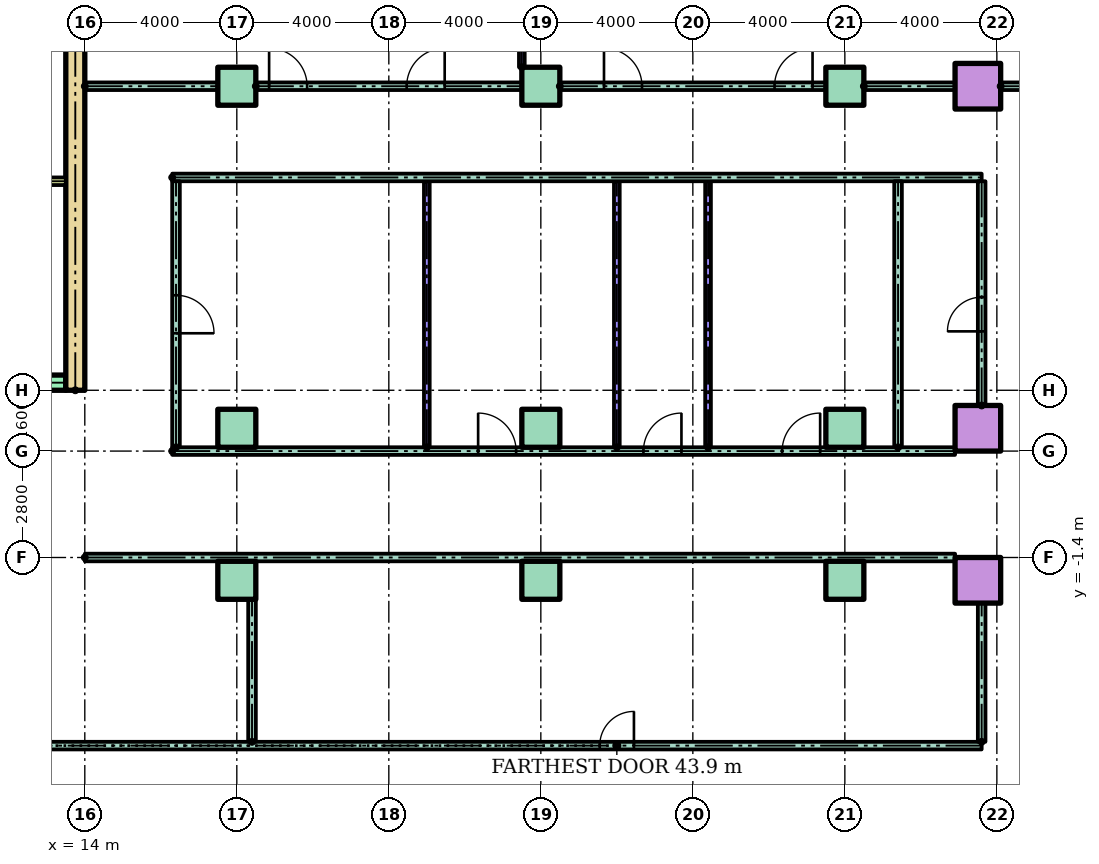
"""IFC4 building model, lengths in metres.
Left out: names, types, materials, properties, quantities, classifications, styles, units other than length and angle.
Written with IfcOpenShell. Run it as: python <this file> out.ifc"""

import sys

from ifc_helpers import new_model, si_unit, direction, frame, frame_2d, origin, origin_2d, place, context, subcontext, project, spatial, rectangle, hollow_rectangle, extrude, element, fill, save


model = new_model("IFC4")
c1 = context("Model", 3, precision=1e-05, world=origin(), true_north=direction((0.0, 1.0)))
c2 = subcontext(c1, "Body", "Model", "MODEL_VIEW")
j1 = project(units=[si_unit("LENGTHUNIT", "METRE"), si_unit("PLANEANGLEUNIT", "RADIAN")], contexts=[c1])
p1 = place(None, origin())
s1 = spatial("IfcSite", under=j1, at=p1, CompositionType="ELEMENT")
p2 = place(p1, origin())
s2 = spatial("IfcBuilding", under=s1, at=p2, CompositionType="ELEMENT")
p3 = place(p2, frame((0.0, 0.0, 10.0)))
s3 = spatial("IfcBuildingStorey", under=s2, at=p3, CompositionType="ELEMENT", Elevation=10.0)
for number, where in (
    (1, (18.0, -2.0, 0.0)),
    (2, (26.0, -2.0, 0.0)),
    (3, (34.0, -2.0, 0.0)),
):
    element("IfcColumn", number, at=place(p3, frame(where)), inside=s3, PredefinedType="COLUMN", context=c2, shape_type="SweptSolid", body=[
        extrude(rectangle(XDim=1.0, YDim=1.0, at=origin_2d()), origin(), (0.0, 0.0, 1.0), 4.0),
    ])
p4 = place(p3, frame((37.5, -2.0, 0.0)))
e4 = element("IfcColumn", 4, at=p4, inside=s3, PredefinedType="COLUMN", context=c2, shape_type="SweptSolid", body=[
    extrude(hollow_rectangle(XDim=1.2, YDim=1.2, WallThickness=0.06, at=origin_2d()), origin(), (0.0, 0.0, 1.0), 4.0),
])
for number, where in (
    (5, (18.0, 2.0, 0.0)),
    (6, (26.0, 2.0, 0.0)),
    (7, (34.0, 2.0, 0.0)),
):
    element("IfcColumn", number, at=place(p3, frame(where)), inside=s3, PredefinedType="COLUMN", context=c2, shape_type="SweptSolid", body=[
        extrude(rectangle(XDim=1.0, YDim=1.0, at=origin_2d()), origin(), (0.0, 0.0, 1.0), 4.0),
    ])
p5 = place(p3, frame((37.5, 2.0, 0.0)))
e8 = element("IfcColumn", 8, at=p5, inside=s3, PredefinedType="COLUMN", context=c2, shape_type="SweptSolid", body=[
    extrude(hollow_rectangle(XDim=1.2, YDim=1.2, WallThickness=0.06, at=origin_2d()), origin(), (0.0, 0.0, 1.0), 4.0),
])
for number, where in (
    (9, (18.0, 11.0, 0.0)),
    (10, (26.0, 11.0, 0.0)),
    (11, (34.0, 11.0, 0.0)),
):
    element("IfcColumn", number, at=place(p3, frame(where)), inside=s3, PredefinedType="COLUMN", context=c2, shape_type="SweptSolid", body=[
        extrude(rectangle(XDim=1.0, YDim=1.0, at=origin_2d()), origin(), (0.0, 0.0, 1.0), 4.0),
    ])
p6 = place(p3, frame((37.5, 11.0, 0.0)))
e12 = element("IfcColumn", 12, at=p6, inside=s3, PredefinedType="COLUMN", context=c2, shape_type="SweptSolid", body=[
    extrude(hollow_rectangle(XDim=1.2, YDim=1.2, WallThickness=0.06, at=origin_2d()), origin(), (0.0, 0.0, 1.0), 4.0),
])
p7 = place(p3, frame((13.75, 3.0, 0.0), z_axis=(0.0, 0.0, 1.0), x_axis=(0.0, 1.0, 0.0)))
e13 = element("IfcWall", 13, at=p7, inside=s3, PredefinedType="SHEAR", context=c2, shape_type="SweptSolid", body=[
    extrude(rectangle(XDim=17.0, YDim=0.5, at=frame_2d((8.5, 0.0))), origin(), (0.0, 0.0, 1.0), 3.7),
])
p8 = place(p3, frame((-13.5, 3.2, 0.0)))
e14 = element("IfcWall", 14, at=p8, inside=s3, PredefinedType="SHEAR", context=c2, shape_type="SweptSolid", body=[
    extrude(rectangle(XDim=27.0, YDim=0.4, at=frame_2d((13.5, 0.0))), origin(), (0.0, 0.0, 1.0), 3.7),
])
p9 = place(p8, frame((6.861, 0.0, 0.0)))
e15 = element("IfcOpeningElement", 15, at=p9, cuts=e14, PredefinedType="OPENING", context=c2, shape_type="SweptSolid", body=[
    extrude(rectangle(XDim=1.1, YDim=2.1, at=frame_2d((0.55, 1.05))), frame((0.0, 0.21, 0.0), z_axis=(0.0, -1.0, 0.0), x_axis=(1.0, 0.0, 0.0)), (0.0, 0.0, 1.0), 0.42),
])
p10 = place(p8, frame((9.906, 0.0, 0.0)))
e16 = element("IfcOpeningElement", 16, at=p10, cuts=e14, PredefinedType="OPENING", context=c2, shape_type="SweptSolid", body=[
    extrude(rectangle(XDim=1.1, YDim=2.1, at=frame_2d((0.55, 1.05))), frame((0.0, 0.21, 0.0), z_axis=(0.0, -1.0, 0.0), x_axis=(1.0, 0.0, 0.0)), (0.0, 0.0, 1.0), 0.42),
])
p11 = place(p8, frame((15.994, 0.0, 0.0)))
e17 = element("IfcOpeningElement", 17, at=p11, cuts=e14, PredefinedType="OPENING", context=c2, shape_type="SweptSolid", body=[
    extrude(rectangle(XDim=1.1, YDim=2.1, at=frame_2d((0.55, 1.05))), frame((0.0, 0.21, 0.0), z_axis=(0.0, -1.0, 0.0), x_axis=(1.0, 0.0, 0.0)), (0.0, 0.0, 1.0), 0.42),
])
p12 = place(p8, frame((19.039, 0.0, 0.0)))
e18 = element("IfcOpeningElement", 18, at=p12, cuts=e14, PredefinedType="OPENING", context=c2, shape_type="SweptSolid", body=[
    extrude(rectangle(XDim=1.1, YDim=2.1, at=frame_2d((0.55, 1.05))), frame((0.0, 0.21, 0.0), z_axis=(0.0, -1.0, 0.0), x_axis=(1.0, 0.0, 0.0)), (0.0, 0.0, 1.0), 0.42),
])
p13 = place(p8, frame((12.6, 0.0, 0.0)))
e19 = element("IfcOpeningElement", 19, at=p13, cuts=e14, PredefinedType="OPENING", context=c2, shape_type="SweptSolid", body=[
    extrude(rectangle(XDim=1.8, YDim=2.1, at=frame_2d((0.9, 1.05))), frame((0.0, 0.21, 0.0), z_axis=(0.0, -1.0, 0.0), x_axis=(1.0, 0.0, 0.0)), (0.0, 0.0, 1.0), 0.42),
])
p14 = place(p3, frame((9.6, 8.5, 0.0)))
e20 = element("IfcWall", 20, at=p14, inside=s3, PredefinedType="PARTITIONING", context=c2, shape_type="SweptSolid", body=[
    extrude(rectangle(XDim=3.9, YDim=0.2, at=frame_2d((1.95, 0.0))), origin(), (0.0, 0.0, 1.0), 3.7),
])
p15 = place(p3, frame((-37.6, -6.35, 0.0)))
e21 = element("IfcWall", 21, at=p15, inside=s3, PredefinedType="PARTITIONING", context=c2, shape_type="SweptSolid", body=[
    extrude(rectangle(XDim=75.2, YDim=0.2, at=frame_2d((37.6, 0.0))), origin(), (0.0, 0.0, 1.0), 3.7),
])
p16 = place(p15, frame((6.5, 0.0, 0.0)))
e22 = element("IfcOpeningElement", 22, at=p16, cuts=e21, PredefinedType="OPENING", context=c2, shape_type="SweptSolid", body=[
    extrude(rectangle(XDim=1.0, YDim=2.1, at=frame_2d((0.5, 1.05))), frame((0.0, 0.11, 0.0), z_axis=(0.0, -1.0, 0.0), x_axis=(1.0, 0.0, 0.0)), (0.0, 0.0, 1.0), 0.22),
])
p17 = place(p15, frame((18.55, 0.0, 0.0)))
e23 = element("IfcOpeningElement", 23, at=p17, cuts=e21, PredefinedType="OPENING", context=c2, shape_type="SweptSolid", body=[
    extrude(rectangle(XDim=0.9, YDim=2.1, at=frame_2d((0.45, 1.05))), frame((0.0, 0.11, 0.0), z_axis=(0.0, -1.0, 0.0), x_axis=(1.0, 0.0, 0.0)), (0.0, 0.0, 1.0), 0.22),
])
p18 = place(p15, frame((27.55, 0.0, 0.0)))
e24 = element("IfcOpeningElement", 24, at=p18, cuts=e21, PredefinedType="OPENING", context=c2, shape_type="SweptSolid", body=[
    extrude(rectangle(XDim=0.9, YDim=2.1, at=frame_2d((0.45, 1.05))), frame((0.0, 0.11, 0.0), z_axis=(0.0, -1.0, 0.0), x_axis=(1.0, 0.0, 0.0)), (0.0, 0.0, 1.0), 0.22),
])
p19 = place(p15, frame((36.55, 0.0, 0.0)))
e25 = element("IfcOpeningElement", 25, at=p19, cuts=e21, PredefinedType="OPENING", context=c2, shape_type="SweptSolid", body=[
    extrude(rectangle(XDim=0.9, YDim=2.1, at=frame_2d((0.45, 1.05))), frame((0.0, 0.11, 0.0), z_axis=(0.0, -1.0, 0.0), x_axis=(1.0, 0.0, 0.0)), (0.0, 0.0, 1.0), 0.22),
])
p20 = place(p15, frame((48.5, 0.0, 0.0)))
e26 = element("IfcOpeningElement", 26, at=p20, cuts=e21, PredefinedType="OPENING", context=c2, shape_type="SweptSolid", body=[
    extrude(rectangle(XDim=1.0, YDim=2.1, at=frame_2d((0.5, 1.05))), frame((0.0, 0.11, 0.0), z_axis=(0.0, -1.0, 0.0), x_axis=(1.0, 0.0, 0.0)), (0.0, 0.0, 1.0), 0.22),
])
p21 = place(p15, frame((65.15, 0.0, 0.0)))
e27 = element("IfcOpeningElement", 27, at=p21, cuts=e21, PredefinedType="OPENING", context=c2, shape_type="SweptSolid", body=[
    extrude(rectangle(XDim=0.9, YDim=2.1, at=frame_2d((0.45, 1.05))), frame((0.0, 0.11, 0.0), z_axis=(0.0, -1.0, 0.0), x_axis=(1.0, 0.0, 0.0)), (0.0, 0.0, 1.0), 0.22),
])
p22 = place(p3, frame((14.0, -1.4, 0.0)))
e28 = element("IfcWall", 28, at=p22, inside=s3, PredefinedType="PARTITIONING", context=c2, shape_type="SweptSolid", body=[
    extrude(rectangle(XDim=22.9, YDim=0.2, at=frame_2d((11.45, 0.0))), origin(), (0.0, 0.0, 1.0), 3.7),
])
p23 = place(p3, frame((16.3, 1.4, 0.0)))
e29 = element("IfcWall", 29, at=p23, inside=s3, PredefinedType="PARTITIONING", context=c2, shape_type="SweptSolid", body=[
    extrude(rectangle(XDim=20.6, YDim=0.2, at=frame_2d((10.3, 0.0))), origin(), (0.0, 0.0, 1.0), 3.7),
])
p24 = place(p23, frame((8.05, 0.0, 0.0)))
e30 = element("IfcOpeningElement", 30, at=p24, cuts=e29, PredefinedType="OPENING", context=c2, shape_type="SweptSolid", body=[
    extrude(rectangle(XDim=1.0, YDim=2.1, at=frame_2d((0.5, 1.05))), frame((0.0, 0.11, 0.0), z_axis=(0.0, -1.0, 0.0), x_axis=(1.0, 0.0, 0.0)), (0.0, 0.0, 1.0), 0.22),
])
p25 = place(p23, frame((12.4, 0.0, 0.0)))
e31 = element("IfcOpeningElement", 31, at=p25, cuts=e29, PredefinedType="OPENING", context=c2, shape_type="SweptSolid", body=[
    extrude(rectangle(XDim=1.0, YDim=2.1, at=frame_2d((0.5, 1.05))), frame((0.0, 0.11, 0.0), z_axis=(0.0, -1.0, 0.0), x_axis=(1.0, 0.0, 0.0)), (0.0, 0.0, 1.0), 0.22),
])
p26 = place(p23, frame((16.05, 0.0, 0.0)))
e32 = element("IfcOpeningElement", 32, at=p26, cuts=e29, PredefinedType="OPENING", context=c2, shape_type="SweptSolid", body=[
    extrude(rectangle(XDim=1.0, YDim=2.1, at=frame_2d((0.5, 1.05))), frame((0.0, 0.11, 0.0), z_axis=(0.0, -1.0, 0.0), x_axis=(1.0, 0.0, 0.0)), (0.0, 0.0, 1.0), 0.22),
])
p27 = place(p3, frame((16.3, 8.6, 0.0)))
e33 = element("IfcWall", 33, at=p27, inside=s3, PredefinedType="PARTITIONING", context=c2, shape_type="SweptSolid", body=[
    extrude(rectangle(XDim=21.3, YDim=0.2, at=frame_2d((10.65, 0.0))), origin(), (0.0, 0.0, 1.0), 3.7),
])
p28 = place(p3, frame((14.0, 11.0, 0.0)))
e34 = element("IfcWall", 34, at=p28, inside=s3, PredefinedType="PARTITIONING", context=c2, shape_type="SweptSolid", body=[
    extrude(rectangle(XDim=3.5, YDim=0.2, at=frame_2d((1.75, 0.0))), origin(), (0.0, 0.0, 1.0), 3.7),
])
p29 = place(p3, frame((18.5, 11.0, 0.0)))
e35 = element("IfcWall", 35, at=p29, inside=s3, PredefinedType="PARTITIONING", context=c2, shape_type="SweptSolid", body=[
    extrude(rectangle(XDim=7.0, YDim=0.2, at=frame_2d((3.5, 0.0))), origin(), (0.0, 0.0, 1.0), 3.7),
])
p30 = place(p29, frame((0.35, 0.0, 0.0)))
e36 = element("IfcOpeningElement", 36, at=p30, cuts=e35, PredefinedType="OPENING", context=c2, shape_type="SweptSolid", body=[
    extrude(rectangle(XDim=1.0, YDim=2.1, at=frame_2d((0.5, 1.05))), frame((0.0, 0.11, 0.0), z_axis=(0.0, -1.0, 0.0), x_axis=(1.0, 0.0, 0.0)), (0.0, 0.0, 1.0), 0.22),
])
p31 = place(p29, frame((3.97, 0.0, 0.0)))
e37 = element("IfcOpeningElement", 37, at=p31, cuts=e35, PredefinedType="OPENING", context=c2, shape_type="SweptSolid", body=[
    extrude(rectangle(XDim=1.0, YDim=2.1, at=frame_2d((0.5, 1.05))), frame((0.0, 0.11, 0.0), z_axis=(0.0, -1.0, 0.0), x_axis=(1.0, 0.0, 0.0)), (0.0, 0.0, 1.0), 0.22),
])
p32 = place(p3, frame((26.5, 11.0, 0.0)))
e38 = element("IfcWall", 38, at=p32, inside=s3, PredefinedType="PARTITIONING", context=c2, shape_type="SweptSolid", body=[
    extrude(rectangle(XDim=7.0, YDim=0.2, at=frame_2d((3.5, 0.0))), origin(), (0.0, 0.0, 1.0), 3.7),
])
p33 = place(p32, frame((1.162, 0.0, 0.0)))
e39 = element("IfcOpeningElement", 39, at=p33, cuts=e38, PredefinedType="OPENING", context=c2, shape_type="SweptSolid", body=[
    extrude(rectangle(XDim=1.0, YDim=2.1, at=frame_2d((0.5, 1.05))), frame((0.0, 0.11, 0.0), z_axis=(0.0, -1.0, 0.0), x_axis=(1.0, 0.0, 0.0)), (0.0, 0.0, 1.0), 0.22),
])
p34 = place(p32, frame((5.65, 0.0, 0.0)))
e40 = element("IfcOpeningElement", 40, at=p34, cuts=e38, PredefinedType="OPENING", context=c2, shape_type="SweptSolid", body=[
    extrude(rectangle(XDim=1.0, YDim=2.1, at=frame_2d((0.5, 1.05))), frame((0.0, 0.11, 0.0), z_axis=(0.0, -1.0, 0.0), x_axis=(1.0, 0.0, 0.0)), (0.0, 0.0, 1.0), 0.22),
])
p35 = place(p3, frame((34.5, 11.0, 0.0)))
e41 = element("IfcWall", 41, at=p35, inside=s3, PredefinedType="PARTITIONING", context=c2, shape_type="SweptSolid", body=[
    extrude(rectangle(XDim=2.4, YDim=0.2, at=frame_2d((1.2, 0.0))), origin(), (0.0, 0.0, 1.0), 3.7),
])
p36 = place(p3, frame((38.1, 11.0, 0.0)))
e42 = element("IfcWall", 42, at=p36, inside=s3, PredefinedType="PARTITIONING", context=c2, shape_type="SweptSolid", body=[
    extrude(rectangle(XDim=1.5, YDim=0.2, at=frame_2d((0.75, 0.0))), origin(), (0.0, 0.0, 1.0), 3.7),
])
p37 = place(p3, frame((16.4, 1.5, 0.0), z_axis=(0.0, 0.0, 1.0), x_axis=(0.0, 1.0, 0.0)))
e43 = element("IfcWall", 43, at=p37, inside=s3, PredefinedType="PARTITIONING", context=c2, shape_type="SweptSolid", body=[
    extrude(rectangle(XDim=7.0, YDim=0.2, at=frame_2d((3.5, 0.0))), origin(), (0.0, 0.0, 1.0), 3.7),
])
p38 = place(p37, frame((3.0, 0.0, 0.0)))
e44 = element("IfcOpeningElement", 44, at=p38, cuts=e43, PredefinedType="OPENING", context=c2, shape_type="SweptSolid", body=[
    extrude(rectangle(XDim=1.0, YDim=2.1, at=frame_2d((0.5, 1.05))), frame((0.0, 0.11, 0.0), z_axis=(0.0, -1.0, 0.0), x_axis=(1.0, 0.0, 0.0)), (0.0, 0.0, 1.0), 0.22),
])
p39 = place(p3, frame((18.4, -6.25, 0.0), z_axis=(0.0, 0.0, 1.0), x_axis=(0.0, 1.0, 0.0)))
e45 = element("IfcWall", 45, at=p39, inside=s3, PredefinedType="PARTITIONING", context=c2, shape_type="SweptSolid", body=[
    extrude(rectangle(XDim=3.75, YDim=0.2, at=frame_2d((1.875, 0.0))), origin(), (0.0, 0.0, 1.0), 3.7),
])
p40 = place(p3, frame((23.0, 1.5, 0.0), z_axis=(0.0, 0.0, 1.0), x_axis=(0.0, 1.0, 0.0)))
e46 = element("IfcWall", 46, at=p40, inside=s3, PredefinedType="PARTITIONING", context=c2, shape_type="SweptSolid", body=[
    extrude(rectangle(XDim=7.0, YDim=0.15, at=frame_2d((3.5, 0.0))), origin(), (0.0, 0.0, 1.0), 3.7),
])
p41 = place(p3, frame((25.5, 11.5, 0.0), z_axis=(0.0, 0.0, 1.0), x_axis=(0.0, 1.0, 0.0)))
e47 = element("IfcWall", 47, at=p41, inside=s3, PredefinedType="PARTITIONING", context=c2, shape_type="SweptSolid", body=[
    extrude(rectangle(XDim=7.4, YDim=0.15, at=frame_2d((3.7, 0.0))), origin(), (0.0, 0.0, 1.0), 3.7),
])
for number, where, z_axis, x_axis in (
    (48, (28.0, 1.5, 0.0), (0.0, 0.0, 1.0), (0.0, 1.0, 0.0)),
    (49, (30.4, 1.5, 0.0), (0.0, 0.0, 1.0), (0.0, 1.0, 0.0)),
):
    element("IfcWall", number, at=place(p3, frame(where, z_axis=z_axis, x_axis=x_axis)), inside=s3, PredefinedType="PARTITIONING", context=c2, shape_type="SweptSolid", body=[
        extrude(rectangle(XDim=7.0, YDim=0.15, at=frame_2d((3.5, 0.0))), origin(), (0.0, 0.0, 1.0), 3.7),
    ])
p42 = place(p3, frame((35.4, 1.5, 0.0), z_axis=(0.0, 0.0, 1.0), x_axis=(0.0, 1.0, 0.0)))
e50 = element("IfcWall", 50, at=p42, inside=s3, PredefinedType="PARTITIONING", context=c2, shape_type="SweptSolid", body=[
    extrude(rectangle(XDim=7.0, YDim=0.2, at=frame_2d((3.5, 0.0))), origin(), (0.0, 0.0, 1.0), 3.7),
])
p43 = place(p3, frame((37.6, -6.25, 0.0), z_axis=(0.0, 0.0, 1.0), x_axis=(0.0, 1.0, 0.0)))
e51 = element("IfcWall", 51, at=p43, inside=s3, PredefinedType="PARTITIONING", context=c2, shape_type="SweptSolid", body=[
    extrude(rectangle(XDim=3.65, YDim=0.2, at=frame_2d((1.825, 0.0))), origin(), (0.0, 0.0, 1.0), 3.7),
])
p44 = place(p3, frame((37.6, 2.6, 0.0), z_axis=(0.0, 0.0, 1.0), x_axis=(0.0, 1.0, 0.0)))
e52 = element("IfcWall", 52, at=p44, inside=s3, PredefinedType="PARTITIONING", context=c2, shape_type="SweptSolid", body=[
    extrude(rectangle(XDim=5.9, YDim=0.2, at=frame_2d((2.95, 0.0))), origin(), (0.0, 0.0, 1.0), 3.7),
])
p45 = place(p44, frame((1.95, 0.0, 0.0)))
e53 = element("IfcOpeningElement", 53, at=p45, cuts=e52, PredefinedType="OPENING", context=c2, shape_type="SweptSolid", body=[
    extrude(rectangle(XDim=0.9, YDim=2.1, at=frame_2d((0.45, 1.05))), frame((0.0, 0.11, 0.0), z_axis=(0.0, -1.0, 0.0), x_axis=(1.0, 0.0, 0.0)), (0.0, 0.0, 1.0), 0.22),
])
p46 = place(p21, origin())
e54 = element("IfcDoor", 54, at=p46, inside=s3, OperationType="SINGLE_SWING_RIGHT", PredefinedType="DOOR", context=c2, shape_type="SweptSolid", body=[
    extrude(rectangle(XDim=0.9, YDim=2.1, at=frame_2d((0.45, 1.05))), frame((0.0, 0.025, 0.0), z_axis=(0.0, -1.0, 0.0), x_axis=(1.0, 0.0, 0.0)), (0.0, 0.0, 1.0), 0.05),
])
fill(e27, e54)
p47 = place(p38, frame((1.0, 0.0, 0.0), z_axis=(0.0, 0.0, 1.0), x_axis=(-1.0, 0.0, 0.0)))
e55 = element("IfcDoor", 55, at=p47, inside=s3, OperationType="SINGLE_SWING_LEFT", PredefinedType="DOOR", context=c2, shape_type="SweptSolid", body=[
    extrude(rectangle(XDim=1.0, YDim=2.1, at=frame_2d((0.5, 1.05))), frame((0.0, 0.025, 0.0), z_axis=(0.0, -1.0, 0.0), x_axis=(1.0, 0.0, 0.0)), (0.0, 0.0, 1.0), 0.05),
])
fill(e44, e55)
p48 = place(p24, origin())
e56 = element("IfcDoor", 56, at=p48, inside=s3, OperationType="SINGLE_SWING_LEFT", PredefinedType="DOOR", context=c2, shape_type="SweptSolid", body=[
    extrude(rectangle(XDim=1.0, YDim=2.1, at=frame_2d((0.5, 1.05))), frame((0.0, 0.025, 0.0), z_axis=(0.0, -1.0, 0.0), x_axis=(1.0, 0.0, 0.0)), (0.0, 0.0, 1.0), 0.05),
])
fill(e30, e56)
p49 = place(p25, origin())
e57 = element("IfcDoor", 57, at=p49, inside=s3, OperationType="SINGLE_SWING_RIGHT", PredefinedType="DOOR", context=c2, shape_type="SweptSolid", body=[
    extrude(rectangle(XDim=1.0, YDim=2.1, at=frame_2d((0.5, 1.05))), frame((0.0, 0.025, 0.0), z_axis=(0.0, -1.0, 0.0), x_axis=(1.0, 0.0, 0.0)), (0.0, 0.0, 1.0), 0.05),
])
fill(e31, e57)
p50 = place(p26, origin())
e58 = element("IfcDoor", 58, at=p50, inside=s3, OperationType="SINGLE_SWING_RIGHT", PredefinedType="DOOR", context=c2, shape_type="SweptSolid", body=[
    extrude(rectangle(XDim=1.0, YDim=2.1, at=frame_2d((0.5, 1.05))), frame((0.0, 0.025, 0.0), z_axis=(0.0, -1.0, 0.0), x_axis=(1.0, 0.0, 0.0)), (0.0, 0.0, 1.0), 0.05),
])
fill(e32, e58)
p51 = place(p45, origin())
e59 = element("IfcDoor", 59, at=p51, inside=s3, OperationType="SINGLE_SWING_LEFT", PredefinedType="DOOR", context=c2, shape_type="SweptSolid", body=[
    extrude(rectangle(XDim=0.9, YDim=2.1, at=frame_2d((0.45, 1.05))), frame((0.0, 0.025, 0.0), z_axis=(0.0, -1.0, 0.0), x_axis=(1.0, 0.0, 0.0)), (0.0, 0.0, 1.0), 0.05),
])
fill(e53, e59)
p52 = place(p30, origin())
e60 = element("IfcDoor", 60, at=p52, inside=s3, OperationType="SINGLE_SWING_LEFT", PredefinedType="DOOR", context=c2, shape_type="SweptSolid", body=[
    extrude(rectangle(XDim=1.0, YDim=2.1, at=frame_2d((0.5, 1.05))), frame((0.0, 0.025, 0.0), z_axis=(0.0, -1.0, 0.0), x_axis=(1.0, 0.0, 0.0)), (0.0, 0.0, 1.0), 0.05),
])
fill(e36, e60)
p53 = place(p31, origin())
e61 = element("IfcDoor", 61, at=p53, inside=s3, OperationType="SINGLE_SWING_RIGHT", PredefinedType="DOOR", context=c2, shape_type="SweptSolid", body=[
    extrude(rectangle(XDim=1.0, YDim=2.1, at=frame_2d((0.5, 1.05))), frame((0.0, 0.025, 0.0), z_axis=(0.0, -1.0, 0.0), x_axis=(1.0, 0.0, 0.0)), (0.0, 0.0, 1.0), 0.05),
])
fill(e37, e61)
p54 = place(p33, origin())
e62 = element("IfcDoor", 62, at=p54, inside=s3, OperationType="SINGLE_SWING_LEFT", PredefinedType="DOOR", context=c2, shape_type="SweptSolid", body=[
    extrude(rectangle(XDim=1.0, YDim=2.1, at=frame_2d((0.5, 1.05))), frame((0.0, 0.025, 0.0), z_axis=(0.0, -1.0, 0.0), x_axis=(1.0, 0.0, 0.0)), (0.0, 0.0, 1.0), 0.05),
])
fill(e39, e62)
p55 = place(p34, origin())
e63 = element("IfcDoor", 63, at=p55, inside=s3, OperationType="SINGLE_SWING_RIGHT", PredefinedType="DOOR", context=c2, shape_type="SweptSolid", body=[
    extrude(rectangle(XDim=1.0, YDim=2.1, at=frame_2d((0.5, 1.05))), frame((0.0, 0.025, 0.0), z_axis=(0.0, -1.0, 0.0), x_axis=(1.0, 0.0, 0.0)), (0.0, 0.0, 1.0), 0.05),
])
fill(e40, e63)
save(model, sys.argv[1])
